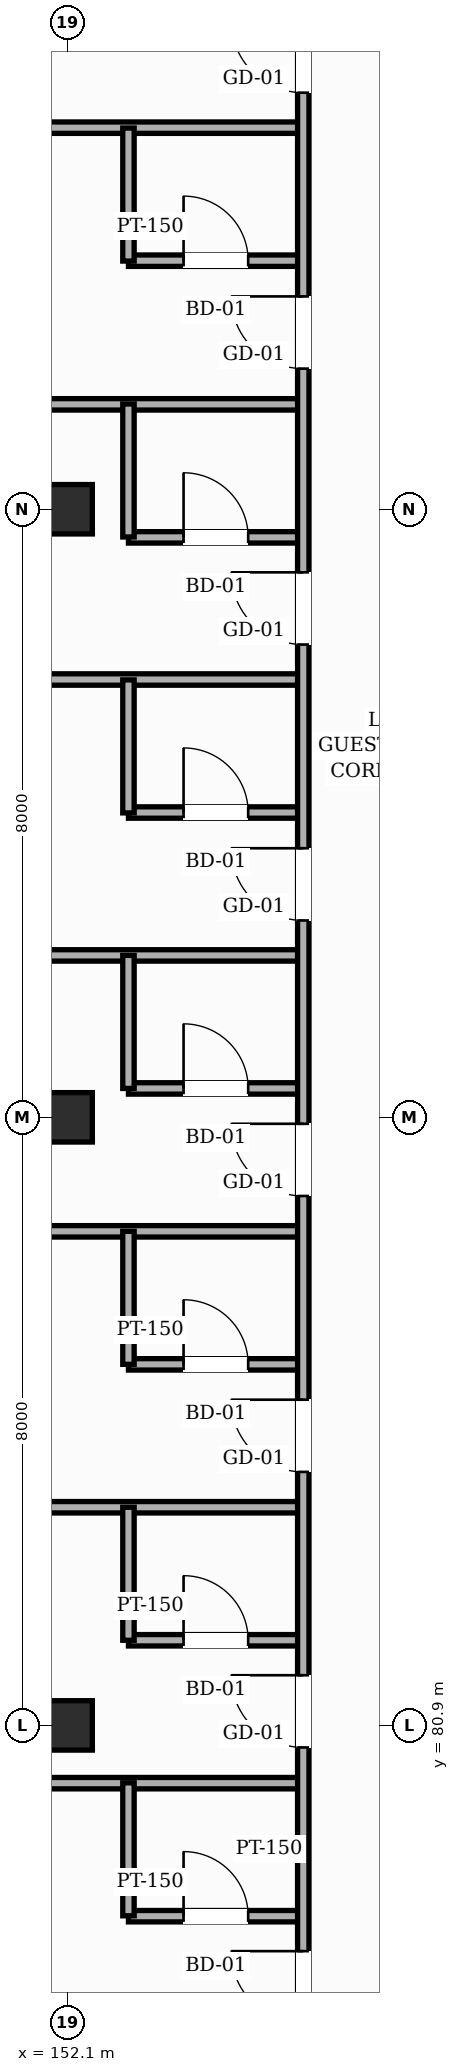
"""IFC4 building model, lengths in metres.
Left out: names, types, materials, properties, quantities, classifications, styles, units other than length and angle.
Written with IfcOpenShell. Run it as: python <this file> out.ifc"""

import sys

from ifc_helpers import new_model, si_unit, direction, frame, frame_2d, origin, origin_2d, place, context, subcontext, project, spatial, rectangle, hollow_rectangle, extrude, element, fill, save


model = new_model("IFC4")
c1 = context("Model", 3, precision=1e-05, world=origin(), true_north=direction((0.0, 1.0)))
c2 = subcontext(c1, "Body", "Model", "MODEL_VIEW")
j1 = project(units=[si_unit("LENGTHUNIT", "METRE"), si_unit("PLANEANGLEUNIT", "RADIAN")], contexts=[c1])
p1 = place(None, origin())
s1 = spatial("IfcSite", under=j1, at=p1, CompositionType="ELEMENT")
p2 = place(p1, origin())
s2 = spatial("IfcBuilding", under=s1, at=p2, CompositionType="ELEMENT")
p3 = place(p2, frame((0.0, 0.0, 19.8)))
s3 = spatial("IfcBuildingStorey", under=s2, at=p3, CompositionType="ELEMENT", Elevation=19.8)
for number, where, z_axis, x_axis in (
    (1, (152.1, 80.9, -0.24), (0.0, 0.0, 1.0), (1.0, 0.0, 0.0)),
    (2, (152.1, 88.9, -0.24), (0.0, 0.0, 1.0), (1.0, 0.0, 0.0)),
):
    element("IfcColumn", number, at=place(p3, frame(where, z_axis=z_axis, x_axis=x_axis)), inside=s3, PredefinedType="COLUMN", context=c2, shape_type="SweptSolid", body=[
        extrude(hollow_rectangle(XDim=0.65, YDim=0.65, WallThickness=0.025, InnerFilletRadius=0.025, OuterFilletRadius=0.05, at=origin_2d()), origin(), (0.0, 0.0, 1.0), 5.04),
    ])
p4 = place(p3, frame((152.1, 96.9, 0.0), z_axis=(0.0, 0.0, 1.0), x_axis=(1.0, 0.0, 0.0)))
e3 = element("IfcColumn", 3, at=p4, inside=s3, PredefinedType="COLUMN", context=c2, shape_type="SweptSolid", body=[
    extrude(hollow_rectangle(XDim=0.65, YDim=0.65, WallThickness=0.025, InnerFilletRadius=0.025, OuterFilletRadius=0.05, at=origin_2d()), origin(), (0.0, 0.0, 1.0), 4.8),
])
p5 = place(p3, frame((152.9, 78.39, 0.0), z_axis=(0.0, 0.0, 1.0), x_axis=(1.0, 0.0, 0.0)))
e4 = element("IfcWall", 4, at=p5, inside=s3, PredefinedType="PARTITIONING", context=c2, shape_type="SweptSolid", body=[
    extrude(rectangle(XDim=2.3, YDim=0.15, at=frame_2d((1.15, 0.0))), origin(), (0.0, 0.0, 1.0), 4.565),
])
p6 = place(p5, frame((0.725, 0.0, 0.0)))
e5 = element("IfcOpeningElement", 5, at=p6, cuts=e4, PredefinedType="OPENING", context=c2, shape_type="SweptSolid", body=[
    extrude(rectangle(XDim=0.85, YDim=2.1, at=frame_2d((0.425, 1.05))), frame((0.0, 0.085, 0.0), z_axis=(0.0, -1.0, 0.0), x_axis=(1.0, 0.0, 0.0)), (0.0, 0.0, 1.0), 0.17),
])
p7 = place(p3, frame((144.2, 80.14, 0.0), z_axis=(0.0, 0.0, 1.0), x_axis=(1.0, 0.0, 0.0)))
e6 = element("IfcWall", 6, at=p7, inside=s3, PredefinedType="PARTITIONING", context=c2, shape_type="SweptSolid", body=[
    extrude(rectangle(XDim=11.0, YDim=0.15, at=frame_2d((5.5, 0.0))), origin(), (0.0, 0.0, 1.0), 4.565),
])
p8 = place(p3, frame((152.9, 82.02, 0.0), z_axis=(0.0, 0.0, 1.0), x_axis=(1.0, 0.0, 0.0)))
e7 = element("IfcWall", 7, at=p8, inside=s3, PredefinedType="PARTITIONING", context=c2, shape_type="SweptSolid", body=[
    extrude(rectangle(XDim=2.3, YDim=0.15, at=frame_2d((1.15, 0.0))), origin(), (0.0, 0.0, 1.0), 4.565),
])
p9 = place(p8, frame((0.725, 0.0, 0.0)))
e8 = element("IfcOpeningElement", 8, at=p9, cuts=e7, PredefinedType="OPENING", context=c2, shape_type="SweptSolid", body=[
    extrude(rectangle(XDim=0.85, YDim=2.1, at=frame_2d((0.425, 1.05))), frame((0.0, 0.085, 0.0), z_axis=(0.0, -1.0, 0.0), x_axis=(1.0, 0.0, 0.0)), (0.0, 0.0, 1.0), 0.17),
])
p10 = place(p3, frame((144.2, 83.77, 0.0), z_axis=(0.0, 0.0, 1.0), x_axis=(1.0, 0.0, 0.0)))
e9 = element("IfcWall", 9, at=p10, inside=s3, PredefinedType="PARTITIONING", context=c2, shape_type="SweptSolid", body=[
    extrude(rectangle(XDim=11.0, YDim=0.15, at=frame_2d((5.5, 0.0))), origin(), (0.0, 0.0, 1.0), 4.565),
])
p11 = place(p3, frame((152.9, 85.65, 0.0), z_axis=(0.0, 0.0, 1.0), x_axis=(1.0, 0.0, 0.0)))
e10 = element("IfcWall", 10, at=p11, inside=s3, PredefinedType="PARTITIONING", context=c2, shape_type="SweptSolid", body=[
    extrude(rectangle(XDim=2.3, YDim=0.15, at=frame_2d((1.15, 0.0))), origin(), (0.0, 0.0, 1.0), 4.565),
])
p12 = place(p11, frame((0.725, 0.0, 0.0)))
e11 = element("IfcOpeningElement", 11, at=p12, cuts=e10, PredefinedType="OPENING", context=c2, shape_type="SweptSolid", body=[
    extrude(rectangle(XDim=0.85, YDim=2.1, at=frame_2d((0.425, 1.05))), frame((0.0, 0.085, 0.0), z_axis=(0.0, -1.0, 0.0), x_axis=(1.0, 0.0, 0.0)), (0.0, 0.0, 1.0), 0.17),
])
p13 = place(p3, frame((144.2, 87.4, 0.0), z_axis=(0.0, 0.0, 1.0), x_axis=(1.0, 0.0, 0.0)))
e12 = element("IfcWall", 12, at=p13, inside=s3, PredefinedType="PARTITIONING", context=c2, shape_type="SweptSolid", body=[
    extrude(rectangle(XDim=11.0, YDim=0.15, at=frame_2d((5.5, 0.0))), origin(), (0.0, 0.0, 1.0), 4.565),
])
p14 = place(p3, frame((152.9, 89.28, 0.0), z_axis=(0.0, 0.0, 1.0), x_axis=(1.0, 0.0, 0.0)))
e13 = element("IfcWall", 13, at=p14, inside=s3, PredefinedType="PARTITIONING", context=c2, shape_type="SweptSolid", body=[
    extrude(rectangle(XDim=2.3, YDim=0.15, at=frame_2d((1.15, 0.0))), origin(), (0.0, 0.0, 1.0), 4.565),
])
p15 = place(p14, frame((0.725, 0.0, 0.0)))
e14 = element("IfcOpeningElement", 14, at=p15, cuts=e13, PredefinedType="OPENING", context=c2, shape_type="SweptSolid", body=[
    extrude(rectangle(XDim=0.85, YDim=2.1, at=frame_2d((0.425, 1.05))), frame((0.0, 0.085, 0.0), z_axis=(0.0, -1.0, 0.0), x_axis=(1.0, 0.0, 0.0)), (0.0, 0.0, 1.0), 0.17),
])
p16 = place(p3, frame((144.2, 91.03, 0.0), z_axis=(0.0, 0.0, 1.0), x_axis=(1.0, 0.0, 0.0)))
e15 = element("IfcWall", 15, at=p16, inside=s3, PredefinedType="PARTITIONING", context=c2, shape_type="SweptSolid", body=[
    extrude(rectangle(XDim=11.0, YDim=0.15, at=frame_2d((5.5, 0.0))), origin(), (0.0, 0.0, 1.0), 4.565),
])
p17 = place(p3, frame((152.9, 92.91, 0.0), z_axis=(0.0, 0.0, 1.0), x_axis=(1.0, 0.0, 0.0)))
e16 = element("IfcWall", 16, at=p17, inside=s3, PredefinedType="PARTITIONING", context=c2, shape_type="SweptSolid", body=[
    extrude(rectangle(XDim=2.3, YDim=0.15, at=frame_2d((1.15, 0.0))), origin(), (0.0, 0.0, 1.0), 4.205),
])
p18 = place(p17, frame((0.725, 0.0, 0.0)))
e17 = element("IfcOpeningElement", 17, at=p18, cuts=e16, PredefinedType="OPENING", context=c2, shape_type="SweptSolid", body=[
    extrude(rectangle(XDim=0.85, YDim=2.1, at=frame_2d((0.425, 1.05))), frame((0.0, 0.085, 0.0), z_axis=(0.0, -1.0, 0.0), x_axis=(1.0, 0.0, 0.0)), (0.0, 0.0, 1.0), 0.17),
])
p19 = place(p3, frame((144.2, 94.66, 0.0), z_axis=(0.0, 0.0, 1.0), x_axis=(1.0, 0.0, 0.0)))
e18 = element("IfcWall", 18, at=p19, inside=s3, PredefinedType="PARTITIONING", context=c2, shape_type="SweptSolid", body=[
    extrude(rectangle(XDim=11.0, YDim=0.15, at=frame_2d((5.5, 0.0))), origin(), (0.0, 0.0, 1.0), 4.565),
])
p20 = place(p3, frame((152.9, 96.53, 0.0), z_axis=(0.0, 0.0, 1.0), x_axis=(1.0, 0.0, 0.0)))
e19 = element("IfcWall", 19, at=p20, inside=s3, PredefinedType="PARTITIONING", context=c2, shape_type="SweptSolid", body=[
    extrude(rectangle(XDim=2.3, YDim=0.15, at=frame_2d((1.15, 0.0))), origin(), (0.0, 0.0, 1.0), 3.905),
])
p21 = place(p20, frame((0.725, 0.0, 0.0)))
e20 = element("IfcOpeningElement", 20, at=p21, cuts=e19, PredefinedType="OPENING", context=c2, shape_type="SweptSolid", body=[
    extrude(rectangle(XDim=0.85, YDim=2.1, at=frame_2d((0.425, 1.05))), frame((0.0, 0.085, 0.0), z_axis=(0.0, -1.0, 0.0), x_axis=(1.0, 0.0, 0.0)), (0.0, 0.0, 1.0), 0.17),
])
p22 = place(p3, frame((144.2, 98.28, 0.0), z_axis=(0.0, 0.0, 1.0), x_axis=(1.0, 0.0, 0.0)))
e21 = element("IfcWall", 21, at=p22, inside=s3, PredefinedType="PARTITIONING", context=c2, shape_type="SweptSolid", body=[
    extrude(rectangle(XDim=11.0, YDim=0.15, at=frame_2d((5.5, 0.0))), origin(), (0.0, 0.0, 1.0), 4.565),
])
p23 = place(p3, frame((152.9, 100.17, 0.0), z_axis=(0.0, 0.0, 1.0), x_axis=(1.0, 0.0, 0.0)))
e22 = element("IfcWall", 22, at=p23, inside=s3, PredefinedType="PARTITIONING", context=c2, shape_type="SweptSolid", body=[
    extrude(rectangle(XDim=2.3, YDim=0.15, at=frame_2d((1.15, 0.0))), origin(), (0.0, 0.0, 1.0), 4.565),
])
p24 = place(p23, frame((0.725, 0.0, 0.0)))
e23 = element("IfcOpeningElement", 23, at=p24, cuts=e22, PredefinedType="OPENING", context=c2, shape_type="SweptSolid", body=[
    extrude(rectangle(XDim=0.85, YDim=2.1, at=frame_2d((0.425, 1.05))), frame((0.0, 0.085, 0.0), z_axis=(0.0, -1.0, 0.0), x_axis=(1.0, 0.0, 0.0)), (0.0, 0.0, 1.0), 0.17),
])
p25 = place(p3, frame((144.2, 101.92, 0.0), z_axis=(0.0, 0.0, 1.0), x_axis=(1.0, 0.0, 0.0)))
e24 = element("IfcWall", 24, at=p25, inside=s3, PredefinedType="PARTITIONING", context=c2, shape_type="SweptSolid", body=[
    extrude(rectangle(XDim=11.0, YDim=0.15, at=frame_2d((5.5, 0.0))), origin(), (0.0, 0.0, 1.0), 4.565),
])
for number, where, z_axis, x_axis in (
    (25, (152.9, 78.395, 0.0), (0.0, 0.0, 1.0), (0.0, 1.0, 0.0)),
    (26, (152.9, 82.02, 0.0), (0.0, 0.0, 1.0), (0.0, 1.0, 0.0)),
    (27, (152.9, 85.65, 0.0), (0.0, 0.0, 1.0), (0.0, 1.0, 0.0)),
    (28, (152.9, 89.28, 0.0), (0.0, 0.0, 1.0), (0.0, 1.0, 0.0)),
    (29, (152.9, 92.905, 0.0), (0.0, 0.0, 1.0), (0.0, 1.0, 0.0)),
    (30, (152.9, 96.535, 0.0), (0.0, 0.0, 1.0), (0.0, 1.0, 0.0)),
    (31, (152.9, 100.165, 0.0), (0.0, 0.0, 1.0), (0.0, 1.0, 0.0)),
):
    element("IfcWall", number, at=place(p3, frame(where, z_axis=z_axis, x_axis=x_axis)), inside=s3, PredefinedType="PARTITIONING", context=c2, shape_type="SweptSolid", body=[
        extrude(rectangle(XDim=1.75, YDim=0.15, at=frame_2d((0.875, 0.0))), origin(), (0.0, 0.0, 1.0), 4.565),
    ])
p26 = place(p3, frame((155.2, 62.0, 0.0), z_axis=(0.0, 0.0, 1.0), x_axis=(0.0, 1.0, 0.0)))
e32 = element("IfcWall", 32, at=p26, inside=s3, PredefinedType="PARTITIONING", context=c2, shape_type="SweptSolid", body=[
    extrude(rectangle(XDim=50.8, YDim=0.15, at=frame_2d((25.4, 0.0))), origin(), (0.0, 0.0, 1.0), 4.565),
])
p27 = place(p26, frame((0.465, 0.0, 0.0)))
e33 = element("IfcOpeningElement", 33, at=p27, cuts=e32, PredefinedType="OPENING", context=c2, shape_type="SweptSolid", body=[
    extrude(rectangle(XDim=0.95, YDim=2.15, at=frame_2d((0.475, 1.075))), frame((0.0, 0.085, 0.0), z_axis=(0.0, -1.0, 0.0), x_axis=(1.0, 0.0, 0.0)), (0.0, 0.0, 1.0), 0.17),
])
p28 = place(p26, frame((4.09, 0.0, 0.0)))
e34 = element("IfcOpeningElement", 34, at=p28, cuts=e32, PredefinedType="OPENING", context=c2, shape_type="SweptSolid", body=[
    extrude(rectangle(XDim=0.95, YDim=2.15, at=frame_2d((0.475, 1.075))), frame((0.0, 0.085, 0.0), z_axis=(0.0, -1.0, 0.0), x_axis=(1.0, 0.0, 0.0)), (0.0, 0.0, 1.0), 0.17),
])
p29 = place(p26, frame((7.72, 0.0, 0.0)))
e35 = element("IfcOpeningElement", 35, at=p29, cuts=e32, PredefinedType="OPENING", context=c2, shape_type="SweptSolid", body=[
    extrude(rectangle(XDim=0.95, YDim=2.15, at=frame_2d((0.475, 1.075))), frame((0.0, 0.085, 0.0), z_axis=(0.0, -1.0, 0.0), x_axis=(1.0, 0.0, 0.0)), (0.0, 0.0, 1.0), 0.17),
])
p30 = place(p26, frame((11.35, 0.0, 0.0)))
e36 = element("IfcOpeningElement", 36, at=p30, cuts=e32, PredefinedType="OPENING", context=c2, shape_type="SweptSolid", body=[
    extrude(rectangle(XDim=0.95, YDim=2.15, at=frame_2d((0.475, 1.075))), frame((0.0, 0.085, 0.0), z_axis=(0.0, -1.0, 0.0), x_axis=(1.0, 0.0, 0.0)), (0.0, 0.0, 1.0), 0.17),
])
p31 = place(p26, frame((14.98, 0.0, 0.0)))
e37 = element("IfcOpeningElement", 37, at=p31, cuts=e32, PredefinedType="OPENING", context=c2, shape_type="SweptSolid", body=[
    extrude(rectangle(XDim=0.95, YDim=2.15, at=frame_2d((0.475, 1.075))), frame((0.0, 0.085, 0.0), z_axis=(0.0, -1.0, 0.0), x_axis=(1.0, 0.0, 0.0)), (0.0, 0.0, 1.0), 0.17),
])
p32 = place(p26, frame((18.61, 0.0, 0.0)))
e38 = element("IfcOpeningElement", 38, at=p32, cuts=e32, PredefinedType="OPENING", context=c2, shape_type="SweptSolid", body=[
    extrude(rectangle(XDim=0.95, YDim=2.15, at=frame_2d((0.475, 1.075))), frame((0.0, 0.085, 0.0), z_axis=(0.0, -1.0, 0.0), x_axis=(1.0, 0.0, 0.0)), (0.0, 0.0, 1.0), 0.17),
])
p33 = place(p26, frame((22.235, 0.0, 0.0)))
e39 = element("IfcOpeningElement", 39, at=p33, cuts=e32, PredefinedType="OPENING", context=c2, shape_type="SweptSolid", body=[
    extrude(rectangle(XDim=0.95, YDim=2.15, at=frame_2d((0.475, 1.075))), frame((0.0, 0.085, 0.0), z_axis=(0.0, -1.0, 0.0), x_axis=(1.0, 0.0, 0.0)), (0.0, 0.0, 1.0), 0.17),
])
p34 = place(p26, frame((25.865, 0.0, 0.0)))
e40 = element("IfcOpeningElement", 40, at=p34, cuts=e32, PredefinedType="OPENING", context=c2, shape_type="SweptSolid", body=[
    extrude(rectangle(XDim=0.95, YDim=2.15, at=frame_2d((0.475, 1.075))), frame((0.0, 0.085, 0.0), z_axis=(0.0, -1.0, 0.0), x_axis=(1.0, 0.0, 0.0)), (0.0, 0.0, 1.0), 0.17),
])
p35 = place(p26, frame((29.49, 0.0, 0.0)))
e41 = element("IfcOpeningElement", 41, at=p35, cuts=e32, PredefinedType="OPENING", context=c2, shape_type="SweptSolid", body=[
    extrude(rectangle(XDim=0.95, YDim=2.15, at=frame_2d((0.475, 1.075))), frame((0.0, 0.085, 0.0), z_axis=(0.0, -1.0, 0.0), x_axis=(1.0, 0.0, 0.0)), (0.0, 0.0, 1.0), 0.17),
])
p36 = place(p26, frame((33.12, 0.0, 0.0)))
e42 = element("IfcOpeningElement", 42, at=p36, cuts=e32, PredefinedType="OPENING", context=c2, shape_type="SweptSolid", body=[
    extrude(rectangle(XDim=0.95, YDim=2.15, at=frame_2d((0.475, 1.075))), frame((0.0, 0.085, 0.0), z_axis=(0.0, -1.0, 0.0), x_axis=(1.0, 0.0, 0.0)), (0.0, 0.0, 1.0), 0.17),
])
p37 = place(p26, frame((36.75, 0.0, 0.0)))
e43 = element("IfcOpeningElement", 43, at=p37, cuts=e32, PredefinedType="OPENING", context=c2, shape_type="SweptSolid", body=[
    extrude(rectangle(XDim=0.95, YDim=2.15, at=frame_2d((0.475, 1.075))), frame((0.0, 0.085, 0.0), z_axis=(0.0, -1.0, 0.0), x_axis=(1.0, 0.0, 0.0)), (0.0, 0.0, 1.0), 0.17),
])
p38 = place(p26, frame((40.38, 0.0, 0.0)))
e44 = element("IfcOpeningElement", 44, at=p38, cuts=e32, PredefinedType="OPENING", context=c2, shape_type="SweptSolid", body=[
    extrude(rectangle(XDim=0.95, YDim=2.15, at=frame_2d((0.475, 1.075))), frame((0.0, 0.085, 0.0), z_axis=(0.0, -1.0, 0.0), x_axis=(1.0, 0.0, 0.0)), (0.0, 0.0, 1.0), 0.17),
])
p39 = place(p26, frame((44.01, 0.0, 0.0)))
e45 = element("IfcOpeningElement", 45, at=p39, cuts=e32, PredefinedType="OPENING", context=c2, shape_type="SweptSolid", body=[
    extrude(rectangle(XDim=0.95, YDim=2.15, at=frame_2d((0.475, 1.075))), frame((0.0, 0.085, 0.0), z_axis=(0.0, -1.0, 0.0), x_axis=(1.0, 0.0, 0.0)), (0.0, 0.0, 1.0), 0.17),
])
p40 = place(p26, frame((47.635, 0.0, 0.0)))
e46 = element("IfcOpeningElement", 46, at=p40, cuts=e32, PredefinedType="OPENING", context=c2, shape_type="SweptSolid", body=[
    extrude(rectangle(XDim=0.95, YDim=2.15, at=frame_2d((0.475, 1.075))), frame((0.0, 0.085, 0.0), z_axis=(0.0, -1.0, 0.0), x_axis=(1.0, 0.0, 0.0)), (0.0, 0.0, 1.0), 0.17),
])
p41 = place(p31, origin())
e47 = element("IfcDoor", 47, at=p41, inside=s3, OperationType="SINGLE_SWING_RIGHT", PredefinedType="DOOR", context=c2, shape_type="SweptSolid", body=[
    extrude(rectangle(XDim=0.95, YDim=2.15, at=frame_2d((0.475, 1.075))), frame((0.0, 0.025, 0.0), z_axis=(0.0, -1.0, 0.0), x_axis=(1.0, 0.0, 0.0)), (0.0, 0.0, 1.0), 0.05),
])
fill(e37, e47)
p42 = place(p6, origin())
e48 = element("IfcDoor", 48, at=p42, inside=s3, OperationType="SINGLE_SWING_LEFT", PredefinedType="DOOR", context=c2, shape_type="SweptSolid", body=[
    extrude(rectangle(XDim=0.85, YDim=2.1, at=frame_2d((0.425, 1.05))), frame((0.0, 0.025, 0.0), z_axis=(0.0, -1.0, 0.0), x_axis=(1.0, 0.0, 0.0)), (0.0, 0.0, 1.0), 0.05),
])
fill(e5, e48)
p43 = place(p32, origin())
e49 = element("IfcDoor", 49, at=p43, inside=s3, OperationType="SINGLE_SWING_RIGHT", PredefinedType="DOOR", context=c2, shape_type="SweptSolid", body=[
    extrude(rectangle(XDim=0.95, YDim=2.15, at=frame_2d((0.475, 1.075))), frame((0.0, 0.025, 0.0), z_axis=(0.0, -1.0, 0.0), x_axis=(1.0, 0.0, 0.0)), (0.0, 0.0, 1.0), 0.05),
])
fill(e38, e49)
p44 = place(p9, origin())
e50 = element("IfcDoor", 50, at=p44, inside=s3, OperationType="SINGLE_SWING_LEFT", PredefinedType="DOOR", context=c2, shape_type="SweptSolid", body=[
    extrude(rectangle(XDim=0.85, YDim=2.1, at=frame_2d((0.425, 1.05))), frame((0.0, 0.025, 0.0), z_axis=(0.0, -1.0, 0.0), x_axis=(1.0, 0.0, 0.0)), (0.0, 0.0, 1.0), 0.05),
])
fill(e8, e50)
p45 = place(p33, origin())
e51 = element("IfcDoor", 51, at=p45, inside=s3, OperationType="SINGLE_SWING_RIGHT", PredefinedType="DOOR", context=c2, shape_type="SweptSolid", body=[
    extrude(rectangle(XDim=0.95, YDim=2.15, at=frame_2d((0.475, 1.075))), frame((0.0, 0.025, 0.0), z_axis=(0.0, -1.0, 0.0), x_axis=(1.0, 0.0, 0.0)), (0.0, 0.0, 1.0), 0.05),
])
fill(e39, e51)
p46 = place(p12, origin())
e52 = element("IfcDoor", 52, at=p46, inside=s3, OperationType="SINGLE_SWING_LEFT", PredefinedType="DOOR", context=c2, shape_type="SweptSolid", body=[
    extrude(rectangle(XDim=0.85, YDim=2.1, at=frame_2d((0.425, 1.05))), frame((0.0, 0.025, 0.0), z_axis=(0.0, -1.0, 0.0), x_axis=(1.0, 0.0, 0.0)), (0.0, 0.0, 1.0), 0.05),
])
fill(e11, e52)
p47 = place(p34, origin())
e53 = element("IfcDoor", 53, at=p47, inside=s3, OperationType="SINGLE_SWING_RIGHT", PredefinedType="DOOR", context=c2, shape_type="SweptSolid", body=[
    extrude(rectangle(XDim=0.95, YDim=2.15, at=frame_2d((0.475, 1.075))), frame((0.0, 0.025, 0.0), z_axis=(0.0, -1.0, 0.0), x_axis=(1.0, 0.0, 0.0)), (0.0, 0.0, 1.0), 0.05),
])
fill(e40, e53)
p48 = place(p15, origin())
e54 = element("IfcDoor", 54, at=p48, inside=s3, OperationType="SINGLE_SWING_LEFT", PredefinedType="DOOR", context=c2, shape_type="SweptSolid", body=[
    extrude(rectangle(XDim=0.85, YDim=2.1, at=frame_2d((0.425, 1.05))), frame((0.0, 0.025, 0.0), z_axis=(0.0, -1.0, 0.0), x_axis=(1.0, 0.0, 0.0)), (0.0, 0.0, 1.0), 0.05),
])
fill(e14, e54)
p49 = place(p35, origin())
e55 = element("IfcDoor", 55, at=p49, inside=s3, OperationType="SINGLE_SWING_RIGHT", PredefinedType="DOOR", context=c2, shape_type="SweptSolid", body=[
    extrude(rectangle(XDim=0.95, YDim=2.15, at=frame_2d((0.475, 1.075))), frame((0.0, 0.025, 0.0), z_axis=(0.0, -1.0, 0.0), x_axis=(1.0, 0.0, 0.0)), (0.0, 0.0, 1.0), 0.05),
])
fill(e41, e55)
p50 = place(p18, origin())
e56 = element("IfcDoor", 56, at=p50, inside=s3, OperationType="SINGLE_SWING_LEFT", PredefinedType="DOOR", context=c2, shape_type="SweptSolid", body=[
    extrude(rectangle(XDim=0.85, YDim=2.1, at=frame_2d((0.425, 1.05))), frame((0.0, 0.025, 0.0), z_axis=(0.0, -1.0, 0.0), x_axis=(1.0, 0.0, 0.0)), (0.0, 0.0, 1.0), 0.05),
])
fill(e17, e56)
p51 = place(p36, origin())
e57 = element("IfcDoor", 57, at=p51, inside=s3, OperationType="SINGLE_SWING_RIGHT", PredefinedType="DOOR", context=c2, shape_type="SweptSolid", body=[
    extrude(rectangle(XDim=0.95, YDim=2.15, at=frame_2d((0.475, 1.075))), frame((0.0, 0.025, 0.0), z_axis=(0.0, -1.0, 0.0), x_axis=(1.0, 0.0, 0.0)), (0.0, 0.0, 1.0), 0.05),
])
fill(e42, e57)
p52 = place(p21, origin())
e58 = element("IfcDoor", 58, at=p52, inside=s3, OperationType="SINGLE_SWING_LEFT", PredefinedType="DOOR", context=c2, shape_type="SweptSolid", body=[
    extrude(rectangle(XDim=0.85, YDim=2.1, at=frame_2d((0.425, 1.05))), frame((0.0, 0.025, 0.0), z_axis=(0.0, -1.0, 0.0), x_axis=(1.0, 0.0, 0.0)), (0.0, 0.0, 1.0), 0.05),
])
fill(e20, e58)
p53 = place(p37, origin())
e59 = element("IfcDoor", 59, at=p53, inside=s3, OperationType="SINGLE_SWING_RIGHT", PredefinedType="DOOR", context=c2, shape_type="SweptSolid", body=[
    extrude(rectangle(XDim=0.95, YDim=2.15, at=frame_2d((0.475, 1.075))), frame((0.0, 0.025, 0.0), z_axis=(0.0, -1.0, 0.0), x_axis=(1.0, 0.0, 0.0)), (0.0, 0.0, 1.0), 0.05),
])
fill(e43, e59)
p54 = place(p24, origin())
e60 = element("IfcDoor", 60, at=p54, inside=s3, OperationType="SINGLE_SWING_LEFT", PredefinedType="DOOR", context=c2, shape_type="SweptSolid", body=[
    extrude(rectangle(XDim=0.85, YDim=2.1, at=frame_2d((0.425, 1.05))), frame((0.0, 0.025, 0.0), z_axis=(0.0, -1.0, 0.0), x_axis=(1.0, 0.0, 0.0)), (0.0, 0.0, 1.0), 0.05),
])
fill(e23, e60)
p55 = place(p38, origin())
e61 = element("IfcDoor", 61, at=p55, inside=s3, OperationType="SINGLE_SWING_RIGHT", PredefinedType="DOOR", context=c2, shape_type="SweptSolid", body=[
    extrude(rectangle(XDim=0.95, YDim=2.15, at=frame_2d((0.475, 1.075))), frame((0.0, 0.025, 0.0), z_axis=(0.0, -1.0, 0.0), x_axis=(1.0, 0.0, 0.0)), (0.0, 0.0, 1.0), 0.05),
])
fill(e44, e61)
save(model, sys.argv[1])
